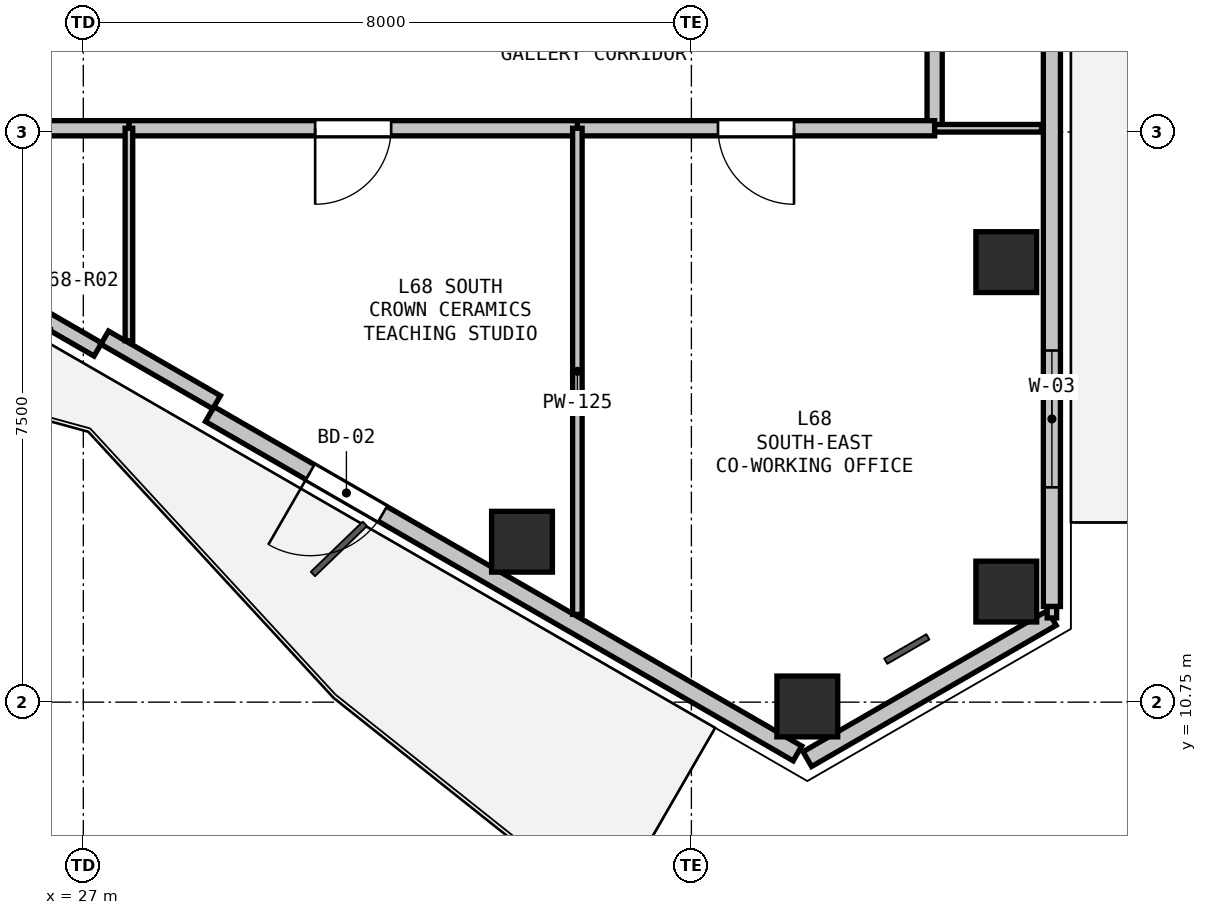
"""IFC4 building model, lengths in metres.
Left out: names, types, materials, properties, quantities, classifications, styles, units other than length and angle.
Written with IfcOpenShell. Run it as: python <this file> out.ifc"""

import sys

from ifc_helpers import new_model, si_unit, direction, frame, frame_2d, origin, origin_2d, place, context, subcontext, project, spatial, rectangle, hollow_rectangle, extrude, element, fill, save


model = new_model("IFC4")
c1 = context("Model", 3, precision=1e-05, world=origin(), true_north=direction((0.0, 1.0)))
c2 = subcontext(c1, "Body", "Model", "MODEL_VIEW")
j1 = project(units=[si_unit("LENGTHUNIT", "METRE"), si_unit("PLANEANGLEUNIT", "RADIAN")], contexts=[c1])
p1 = place(None, origin())
s1 = spatial("IfcSite", under=j1, at=p1, CompositionType="ELEMENT")
p2 = place(p1, origin())
s2 = spatial("IfcBuilding", under=s1, at=p2, CompositionType="ELEMENT")
p3 = place(p2, frame((0.0, 0.0, 243.0)))
s3 = spatial("IfcBuildingStorey", under=s2, at=p3, CompositionType="ELEMENT", Elevation=243.0)
for number, where, z_axis, x_axis in (
    (1, (39.143, 16.539, 0.0), (0.0, 0.0, 1.0), (1.0, 0.0, 0.0)),
    (2, (39.143, 12.205, 0.0), (0.0, 0.0, 1.0), (1.0, 0.0, 0.0)),
    (3, (36.525, 10.693, 0.0), (0.0, 0.0, 1.0), (1.0, 0.0, 0.0)),
    (4, (32.771, 12.861, 0.0), (0.0, 0.0, 1.0), (1.0, 0.0, 0.0)),
):
    element("IfcColumn", number, at=place(p3, frame(where, z_axis=z_axis, x_axis=x_axis)), inside=s3, PredefinedType="COLUMN", context=c2, shape_type="SweptSolid", body=[
        extrude(hollow_rectangle(XDim=0.8, YDim=0.8, WallThickness=0.025, at=origin_2d()), origin(), (0.0, 0.0, 1.0), 3.3),
    ])
p4 = place(p3, frame((39.743, 11.858, 0.0), z_axis=(0.0, 0.0, 1.0), x_axis=(-0.866038962515, -0.499976514854, 0.0)))
e5 = element("IfcWall", 5, at=p4, inside=s3, PredefinedType="SOLIDWALL", context=c2, shape_type="SweptSolid", body=[
    extrude(rectangle(XDim=3.716, YDim=0.225, at=frame_2d((1.858, 0.0))), origin(), (0.0, 0.0, 1.0), 2.7),
])
p5 = place(p3, frame((39.743, 20.936, 0.0), z_axis=(0.0, 0.0, 1.0), x_axis=(0.0, -1.0, 0.0)))
e6 = element("IfcWall", 6, at=p5, inside=s3, PredefinedType="SOLIDWALL", context=c2, shape_type="SweptSolid", body=[
    extrude(rectangle(XDim=8.928, YDim=0.225, at=frame_2d((4.464, 0.0))), origin(), (0.0, 0.0, 1.0), 2.7),
])
p6 = place(p5, frame((5.56, 0.0, 0.9)))
e7 = element("IfcOpeningElement", 7, at=p6, cuts=e6, PredefinedType="OPENING", context=c2, shape_type="SweptSolid", body=[
    extrude(rectangle(XDim=1.8, YDim=1.5, at=frame_2d((0.9, 0.75))), frame((0.0, 0.123, 0.0), z_axis=(0.0, -1.0, 0.0), x_axis=(1.0, 0.0, 0.0)), (0.0, 0.0, 1.0), 0.245),
])
p7 = place(p3, frame((36.395, 10.076, 0.0), z_axis=(0.0, 0.0, 1.0), x_axis=(-0.866026655105, 0.499997832642, 0.0)))
e8 = element("IfcWall", 8, at=p7, inside=s3, PredefinedType="SOLIDWALL", context=c2, shape_type="SweptSolid", body=[
    extrude(rectangle(XDim=8.928, YDim=0.225, at=frame_2d((4.464, 0.0))), origin(), (0.0, 0.0, 1.0), 2.7),
])
p8 = place(p7, frame((6.302, 0.0, 0.0)))
e9 = element("IfcOpeningElement", 9, at=p8, cuts=e8, PredefinedType="OPENING", context=c2, shape_type="SweptSolid", body=[
    extrude(rectangle(XDim=1.1, YDim=2.1, at=frame_2d((0.55, 1.05))), frame((0.0, 0.123, 0.0), z_axis=(0.0, -1.0, 0.0), x_axis=(1.0, 0.0, 0.0)), (0.0, 0.0, 1.0), 0.245),
])
p9 = place(p3, frame((27.191, 15.389, 0.0), z_axis=(0.0, 0.0, 1.0), x_axis=(-0.866019557082, 0.500010126649, 0.0)))
e10 = element("IfcWall", 10, at=p9, inside=s3, PredefinedType="PARAPET", context=c2, shape_type="SweptSolid", body=[
    extrude(rectangle(XDim=8.228, YDim=0.2, at=frame_2d((4.114, 0.0))), origin(), (0.0, 0.0, 1.0), 0.2),
])
p10 = place(p3, frame((28.754, 14.695, 0.0), z_axis=(0.0, 0.0, 1.0), x_axis=(-0.866025371046, 0.500000056704, 0.0)))
e11 = element("IfcWall", 11, at=p10, inside=s3, PredefinedType="PARAPET", context=c2, shape_type="SweptSolid", body=[
    extrude(rectangle(XDim=1.7, YDim=0.2, at=frame_2d((0.85, 0.0))), origin(), (0.0, 0.0, 1.0), 2.7),
])
p11 = place(p3, frame((38.2, 20.75, 0.0), z_axis=(0.0, 0.0, 1.0), x_axis=(0.0, -1.0, 0.0)))
e12 = element("IfcWall", 12, at=p11, inside=s3, PredefinedType="PARTITIONING", context=c2, shape_type="SweptSolid", body=[
    extrude(rectangle(XDim=2.45, YDim=0.2, at=frame_2d((1.225, 0.0))), origin(), (0.0, 0.0, 1.0), 3.08),
])
p12 = place(p3, frame((38.2, 18.3, 0.0), z_axis=(0.0, 0.0, 1.0), x_axis=(-1.0, 0.0, 0.0)))
e13 = element("IfcWall", 13, at=p12, inside=s3, PredefinedType="PARTITIONING", context=c2, shape_type="SweptSolid", body=[
    extrude(rectangle(XDim=4.7, YDim=0.2, at=frame_2d((2.35, 0.0))), origin(), (0.0, 0.0, 1.0), 2.528),
])
p13 = place(p12, frame((1.85, 0.0, 0.0)))
e14 = element("IfcOpeningElement", 14, at=p13, cuts=e13, PredefinedType="OPENING", context=c2, shape_type="SweptSolid", body=[
    extrude(rectangle(XDim=1.0, YDim=2.15, at=frame_2d((0.5, 1.075))), frame((0.0, 0.11, 0.0), z_axis=(0.0, -1.0, 0.0), x_axis=(1.0, 0.0, 0.0)), (0.0, 0.0, 1.0), 0.22),
])
p14 = place(p3, frame((33.5, 18.3, 0.0), z_axis=(0.0, 0.0, 1.0), x_axis=(-1.0, 0.0, 0.0)))
e15 = element("IfcWall", 15, at=p14, inside=s3, PredefinedType="PARTITIONING", context=c2, shape_type="SweptSolid", body=[
    extrude(rectangle(XDim=5.9, YDim=0.2, at=frame_2d((2.95, 0.0))), origin(), (0.0, 0.0, 1.0), 3.08),
])
p15 = place(p14, frame((2.45, 0.0, 0.0)))
e16 = element("IfcOpeningElement", 16, at=p15, cuts=e15, PredefinedType="OPENING", context=c2, shape_type="SweptSolid", body=[
    extrude(rectangle(XDim=1.0, YDim=2.15, at=frame_2d((0.5, 1.075))), frame((0.0, 0.11, 0.0), z_axis=(0.0, -1.0, 0.0), x_axis=(1.0, 0.0, 0.0)), (0.0, 0.0, 1.0), 0.22),
])
p16 = place(p3, frame((27.6, 18.3, 0.0), z_axis=(0.0, 0.0, 1.0), x_axis=(-1.0, 0.0, 0.0)))
e17 = element("IfcWall", 17, at=p16, inside=s3, PredefinedType="PARTITIONING", context=c2, shape_type="SweptSolid", body=[
    extrude(rectangle(XDim=4.0, YDim=0.2, at=frame_2d((2.0, 0.0))), origin(), (0.0, 0.0, 1.0), 2.365),
])
p17 = place(p16, frame((1.1, 0.0, 0.0)))
e18 = element("IfcOpeningElement", 18, at=p17, cuts=e17, PredefinedType="OPENING", context=c2, shape_type="SweptSolid", body=[
    extrude(rectangle(XDim=1.8, YDim=2.2, at=frame_2d((0.9, 1.1))), frame((0.0, 0.11, 0.0), z_axis=(0.0, -1.0, 0.0), x_axis=(1.0, 0.0, 0.0)), (0.0, 0.0, 1.0), 0.22),
])
p18 = place(p3, frame((27.6, 18.3, 0.0), z_axis=(0.0, 0.0, 1.0), x_axis=(0.0, -1.0, 0.0)))
e19 = element("IfcWall", 19, at=p18, inside=s3, PredefinedType="PARTITIONING", context=c2, shape_type="SweptSolid", body=[
    extrude(rectangle(XDim=2.795, YDim=0.1, at=frame_2d((1.398, 0.0))), origin(), (0.0, 0.0, 1.0), 2.365),
])
p19 = place(p3, frame((33.5, 18.3, 0.0), z_axis=(0.0, 0.0, 1.0), x_axis=(0.0, -1.0, 0.0)))
e20 = element("IfcWall", 20, at=p19, inside=s3, PredefinedType="PARTITIONING", context=c2, shape_type="SweptSolid", body=[
    extrude(rectangle(XDim=6.395, YDim=0.125, at=frame_2d((3.198, 0.0))), origin(), (0.0, 0.0, 1.0), 2.805),
])
p20 = place(p3, frame((38.2, 18.3, 0.0), z_axis=(0.0, 0.0, 1.0), x_axis=(1.0, 0.0, 0.0)))
e21 = element("IfcWall", 21, at=p20, inside=s3, PredefinedType="PARTITIONING", context=c2, shape_type="SweptSolid", body=[
    extrude(rectangle(XDim=1.406, YDim=0.1, at=frame_2d((0.703, 0.0))), origin(), (0.0, 0.0, 1.0), 2.365),
])
p21 = place(p3, frame((39.743, 12.008, 0.0), z_axis=(0.0, 0.0, 1.0), x_axis=(0.0, -1.0, 0.0)))
e22 = element("IfcWall", 22, at=p21, inside=s3, PredefinedType="PARTITIONING", context=c2, shape_type="SweptSolid", body=[
    extrude(rectangle(XDim=0.15, YDim=0.125, at=frame_2d((0.075, 0.0))), origin(), (0.0, 0.0, 1.0), 3.08),
])
p22 = place(p6, origin())
e23 = element("IfcWindow", 23, at=p22, inside=s3, PartitioningType="SINGLE_PANEL", PredefinedType="WINDOW", context=c2, shape_type="SweptSolid", body=[
    extrude(rectangle(XDim=1.8, YDim=1.5, at=frame_2d((0.9, 0.75))), frame((0.0, 0.03, 0.0), z_axis=(0.0, -1.0, 0.0), x_axis=(1.0, 0.0, 0.0)), (0.0, 0.0, 1.0), 0.06),
])
fill(e7, e23)
p23 = place(p8, origin())
e24 = element("IfcDoor", 24, at=p23, inside=s3, OperationType="SINGLE_SWING_RIGHT", PredefinedType="DOOR", context=c2, shape_type="SweptSolid", body=[
    extrude(rectangle(XDim=1.1, YDim=2.1, at=frame_2d((0.55, 1.05))), frame((0.0, 0.025, 0.0), z_axis=(0.0, -1.0, 0.0), x_axis=(1.0, 0.0, 0.0)), (0.0, 0.0, 1.0), 0.05),
])
fill(e9, e24)
p24 = place(p15, origin())
e25 = element("IfcDoor", 25, at=p24, inside=s3, OperationType="SINGLE_SWING_RIGHT", PredefinedType="DOOR", context=c2, shape_type="SweptSolid", body=[
    extrude(rectangle(XDim=1.0, YDim=2.15, at=frame_2d((0.5, 1.075))), frame((0.0, 0.025, 0.0), z_axis=(0.0, -1.0, 0.0), x_axis=(1.0, 0.0, 0.0)), (0.0, 0.0, 1.0), 0.05),
])
fill(e16, e25)
p25 = place(p13, origin())
e26 = element("IfcDoor", 26, at=p25, inside=s3, OperationType="SINGLE_SWING_LEFT", PredefinedType="DOOR", context=c2, shape_type="SweptSolid", body=[
    extrude(rectangle(XDim=1.0, YDim=2.15, at=frame_2d((0.5, 1.075))), frame((0.0, 0.025, 0.0), z_axis=(0.0, -1.0, 0.0), x_axis=(1.0, 0.0, 0.0)), (0.0, 0.0, 1.0), 0.05),
])
fill(e14, e26)
save(model, sys.argv[1])
